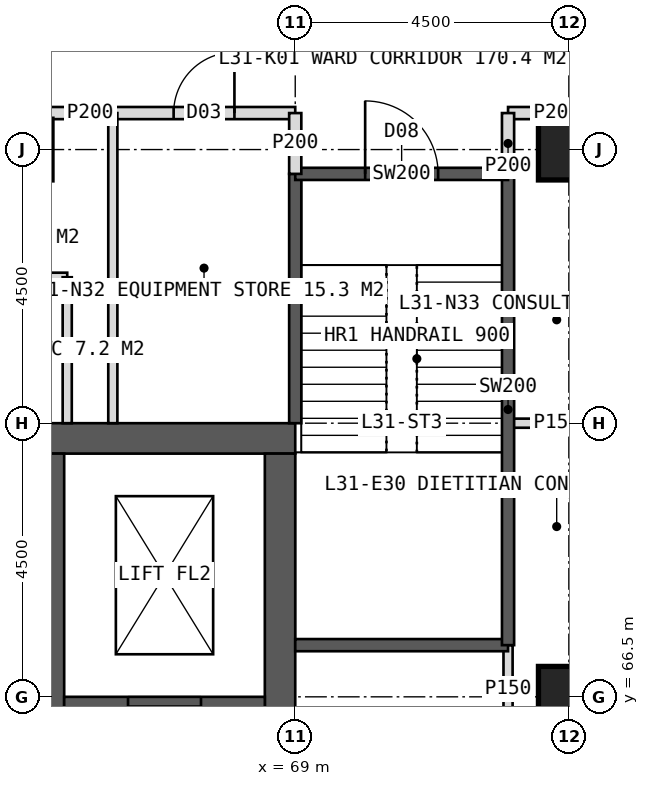
"""IFC4 building model, lengths in metres.
Left out: names, types, materials, properties, quantities, classifications, styles, units other than length and angle.
Written with IfcOpenShell. Run it as: python <this file> out.ifc"""

import sys

from ifc_helpers import new_model, si_unit, direction, frame, frame_2d, origin, origin_2d, place, context, subcontext, project, spatial, rectangle, hollow_rectangle, extrude, element, fill, save


model = new_model("IFC4")
c1 = context("Model", 3, precision=1e-05, world=origin(), true_north=direction((0.0, 1.0)))
c2 = subcontext(c1, "Body", "Model", "MODEL_VIEW")
j1 = project(units=[si_unit("LENGTHUNIT", "METRE"), si_unit("PLANEANGLEUNIT", "RADIAN")], contexts=[c1])
p1 = place(None, origin())
s1 = spatial("IfcSite", under=j1, at=p1, CompositionType="ELEMENT")
p2 = place(p1, origin())
s2 = spatial("IfcBuilding", under=s1, at=p2, CompositionType="ELEMENT")
p3 = place(p2, frame((0.0, 0.0, 132.0)))
s3 = spatial("IfcBuildingStorey", under=s2, at=p3, CompositionType="ELEMENT", Elevation=132.0)
p4 = place(p3, frame((51.0, 70.75, 0.0), z_axis=(0.0, 0.0, 1.0), x_axis=(1.0, 0.0, 0.0)))
e1 = element("IfcWall", 1, at=p4, inside=s3, PredefinedType="SHEAR", context=c2, shape_type="SweptSolid", body=[
    extrude(rectangle(XDim=18.0, YDim=0.5, at=frame_2d((9.0, 0.0))), origin(), (0.0, 0.0, 1.0), 4.0),
])
p5 = place(p4, frame((8.1, 0.0, 0.0)))
e2 = element("IfcOpeningElement", 2, at=p5, cuts=e1, PredefinedType="OPENING", context=c2, shape_type="SweptSolid", body=[
    extrude(rectangle(XDim=1.8, YDim=2.2, at=frame_2d((0.9, 1.1))), frame((0.0, 0.26, 0.0), z_axis=(0.0, -1.0, 0.0), x_axis=(1.0, 0.0, 0.0)), (0.0, 0.0, 1.0), 0.52),
])
p6 = place(p3, frame((68.75, 53.5, 0.0), z_axis=(0.0, 0.0, 1.0), x_axis=(0.0, 1.0, 0.0)))
e3 = element("IfcWall", 3, at=p6, inside=s3, PredefinedType="SHEAR", context=c2, shape_type="SweptSolid", body=[
    extrude(rectangle(XDim=17.0, YDim=0.5, at=frame_2d((8.5, 0.0))), origin(), (0.0, 0.0, 1.0), 4.0),
])
p7 = place(p6, frame((9.5, 0.0, 0.0)))
e4 = element("IfcOpeningElement", 4, at=p7, cuts=e3, PredefinedType="OPENING", context=c2, shape_type="SweptSolid", body=[
    extrude(rectangle(XDim=1.5, YDim=2.2, at=frame_2d((0.75, 1.1))), frame((0.0, 0.26, 0.0), z_axis=(0.0, -1.0, 0.0), x_axis=(1.0, 0.0, 0.0)), (0.0, 0.0, 1.0), 0.52),
])
p8 = place(p3, frame((65.05, 53.5, 0.0), z_axis=(0.0, 0.0, 1.0), x_axis=(0.0, 1.0, 0.0)))
e5 = element("IfcWall", 5, at=p8, inside=s3, PredefinedType="SHEAR", context=c2, shape_type="SweptSolid", body=[
    extrude(rectangle(XDim=17.0, YDim=0.3, at=frame_2d((8.5, 0.0))), origin(), (0.0, 0.0, 1.0), 4.0),
])
p9 = place(p3, frame((65.2, 66.35, 0.0), z_axis=(0.0, 0.0, 1.0), x_axis=(1.0, 0.0, 0.0)))
e6 = element("IfcWall", 6, at=p9, inside=s3, PredefinedType="SHEAR", context=c2, shape_type="SweptSolid", body=[
    extrude(rectangle(XDim=3.3, YDim=0.3, at=frame_2d((1.65, 0.0))), origin(), (0.0, 0.0, 1.0), 4.0),
])
p10 = place(p9, frame((1.05, 0.0, 0.0)))
e7 = element("IfcOpeningElement", 7, at=p10, cuts=e6, PredefinedType="OPENING", context=c2, shape_type="SweptSolid", body=[
    extrude(rectangle(XDim=1.2, YDim=2.2, at=frame_2d((0.6, 1.1))), frame((0.0, 0.16, 0.0), z_axis=(0.0, -1.0, 0.0), x_axis=(1.0, 0.0, 0.0)), (0.0, 0.0, 1.0), 0.32),
])
for number, where, z_axis, x_axis in (
    (8, (73.5, 75.5, 0.0), (0.0, 0.0, 1.0), (1.0, 0.0, 0.0)),
    (9, (73.5, 66.5, 0.0), (0.0, 0.0, 1.0), (1.0, 0.0, 0.0)),
):
    element("IfcColumn", number, at=place(p3, frame(where, z_axis=z_axis, x_axis=x_axis)), inside=s3, PredefinedType="COLUMN", context=c2, shape_type="SweptSolid", body=[
        extrude(hollow_rectangle(XDim=1.0, YDim=1.0, WallThickness=0.1, at=origin_2d()), origin(), (0.0, 0.0, 1.0), 4.0),
    ])
p11 = place(p3, frame((62.25, 76.1, 0.0), z_axis=(0.0, 0.0, 1.0), x_axis=(1.0, 0.0, 0.0)))
e10 = element("IfcWall", 10, at=p11, inside=s3, PredefinedType="PARTITIONING", context=c2, shape_type="SweptSolid", body=[
    extrude(rectangle(XDim=6.75, YDim=0.2, at=frame_2d((3.375, 0.0))), origin(), (0.0, 0.0, 1.0), 3.75),
])
p12 = place(p11, frame((0.325, 0.0, 0.0)))
e11 = element("IfcOpeningElement", 11, at=p12, cuts=e10, PredefinedType="OPENING", context=c2, shape_type="SweptSolid", body=[
    extrude(rectangle(XDim=1.0, YDim=2.1, at=frame_2d((0.5, 1.05))), frame((0.0, 0.11, 0.0), z_axis=(0.0, -1.0, 0.0), x_axis=(1.0, 0.0, 0.0)), (0.0, 0.0, 1.0), 0.22),
])
p13 = place(p11, frame((4.75, 0.0, 0.0)))
e12 = element("IfcOpeningElement", 12, at=p13, cuts=e10, PredefinedType="OPENING", context=c2, shape_type="SweptSolid", body=[
    extrude(rectangle(XDim=1.0, YDim=2.1, at=frame_2d((0.5, 1.05))), frame((0.0, 0.11, 0.0), z_axis=(0.0, -1.0, 0.0), x_axis=(1.0, 0.0, 0.0)), (0.0, 0.0, 1.0), 0.22),
])
p14 = place(p3, frame((72.5, 76.1, 0.0), z_axis=(0.0, 0.0, 1.0), x_axis=(1.0, 0.0, 0.0)))
e13 = element("IfcWall", 13, at=p14, inside=s3, PredefinedType="PARTITIONING", context=c2, shape_type="SweptSolid", body=[
    extrude(rectangle(XDim=1.6, YDim=0.2, at=frame_2d((0.8, 0.0))), origin(), (0.0, 0.0, 1.0), 3.75),
])
p15 = place(p3, frame((66.0, 71.0, 0.0), z_axis=(0.0, 0.0, 1.0), x_axis=(0.0, 1.0, 0.0)))
e14 = element("IfcWall", 14, at=p15, inside=s3, PredefinedType="PARTITIONING", context=c2, shape_type="SweptSolid", body=[
    extrude(rectangle(XDim=5.1, YDim=0.15, at=frame_2d((2.55, 0.0))), origin(), (0.0, 0.0, 1.0), 3.75),
])
p16 = place(p3, frame((62.25, 73.4, 0.0), z_axis=(0.0, 0.0, 1.0), x_axis=(1.0, 0.0, 0.0)))
e15 = element("IfcWall", 15, at=p16, inside=s3, PredefinedType="PARTITIONING", context=c2, shape_type="SweptSolid", body=[
    extrude(rectangle(XDim=3.0, YDim=0.15, at=frame_2d((1.5, 0.0))), origin(), (0.0, 0.0, 1.0), 3.75),
])
p17 = place(p3, frame((65.25, 71.0, 0.0), z_axis=(0.0, 0.0, 1.0), x_axis=(0.0, 1.0, 0.0)))
e16 = element("IfcWall", 16, at=p17, inside=s3, PredefinedType="PARTITIONING", context=c2, shape_type="SweptSolid", body=[
    extrude(rectangle(XDim=2.4, YDim=0.15, at=frame_2d((1.2, 0.0))), origin(), (0.0, 0.0, 1.0), 3.75),
])
p18 = place(p3, frame((72.5, 71.0, 0.0), z_axis=(0.0, 0.0, 1.0), x_axis=(1.0, 0.0, 0.0)))
e17 = element("IfcWall", 17, at=p18, inside=s3, PredefinedType="PARTITIONING", context=c2, shape_type="SweptSolid", body=[
    extrude(rectangle(XDim=1.6, YDim=0.15, at=frame_2d((0.8, 0.0))), origin(), (0.0, 0.0, 1.0), 3.75),
])
p19 = place(p3, frame((72.5, 65.9, 0.0), z_axis=(0.0, 0.0, 1.0), x_axis=(0.0, 1.0, 0.0)))
e18 = element("IfcWall", 18, at=p19, inside=s3, PredefinedType="PARTITIONING", context=c2, shape_type="SweptSolid", body=[
    extrude(rectangle(XDim=1.45, YDim=0.15, at=frame_2d((0.725, 0.0))), origin(), (0.0, 0.0, 1.0), 3.75),
])
p20 = place(p3, frame((69.0, 71.0, 0.0), z_axis=(0.0, 0.0, 1.0), x_axis=(0.0, 1.0, 0.0)))
e19 = element("IfcWall", 19, at=p20, inside=s3, PredefinedType="SOLIDWALL", context=c2, shape_type="SweptSolid", body=[
    extrude(rectangle(XDim=4.1, YDim=0.2, at=frame_2d((2.05, 0.0))), origin(), (0.0, 0.0, 1.0), 3.75),
])
p21 = place(p3, frame((69.0, 67.35, 0.0), z_axis=(0.0, 0.0, 1.0), x_axis=(1.0, 0.0, 0.0)))
e20 = element("IfcWall", 20, at=p21, inside=s3, PredefinedType="SOLIDWALL", context=c2, shape_type="SweptSolid", body=[
    extrude(rectangle(XDim=3.5, YDim=0.2, at=frame_2d((1.75, 0.0))), origin(), (0.0, 0.0, 1.0), 3.75),
])
p22 = place(p3, frame((72.5, 67.35, 0.0), z_axis=(0.0, 0.0, 1.0), x_axis=(0.0, 1.0, 0.0)))
e21 = element("IfcWall", 21, at=p22, inside=s3, PredefinedType="SOLIDWALL", context=c2, shape_type="SweptSolid", body=[
    extrude(rectangle(XDim=7.75, YDim=0.2, at=frame_2d((3.875, 0.0))), origin(), (0.0, 0.0, 1.0), 3.75),
])
p23 = place(p3, frame((69.0, 75.1, 0.0), z_axis=(0.0, 0.0, 1.0), x_axis=(1.0, 0.0, 0.0)))
e22 = element("IfcWall", 22, at=p23, inside=s3, PredefinedType="SOLIDWALL", context=c2, shape_type="SweptSolid", body=[
    extrude(rectangle(XDim=3.5, YDim=0.2, at=frame_2d((1.75, 0.0))), origin(), (0.0, 0.0, 1.0), 3.75),
])
p24 = place(p23, frame((1.15, 0.0, 0.0)))
e23 = element("IfcOpeningElement", 23, at=p24, cuts=e22, PredefinedType="OPENING", context=c2, shape_type="SweptSolid", body=[
    extrude(rectangle(XDim=1.2, YDim=2.1, at=frame_2d((0.6, 1.05))), frame((0.0, 0.11, 0.0), z_axis=(0.0, -1.0, 0.0), x_axis=(1.0, 0.0, 0.0)), (0.0, 0.0, 1.0), 0.22),
])
for number, where, z_axis, x_axis in (
    (24, (69.0, 75.1, 0.0), (0.0, 0.0, 1.0), (0.0, 1.0, 0.0)),
    (25, (72.5, 75.1, 0.0), (0.0, 0.0, 1.0), (0.0, 1.0, 0.0)),
):
    element("IfcWall", number, at=place(p3, frame(where, z_axis=z_axis, x_axis=x_axis)), inside=s3, PredefinedType="PARTITIONING", context=c2, shape_type="SweptSolid", body=[
        extrude(rectangle(XDim=1.0, YDim=0.2, at=frame_2d((0.5, 0.0))), origin(), (0.0, 0.0, 1.0), 3.75),
    ])
p25 = place(p13, origin())
e26 = element("IfcDoor", 26, at=p25, inside=s3, OperationType="SINGLE_SWING_RIGHT", PredefinedType="DOOR", context=c2, shape_type="SweptSolid", body=[
    extrude(rectangle(XDim=1.0, YDim=2.1, at=frame_2d((0.5, 1.05))), frame((0.0, 0.025, 0.0), z_axis=(0.0, -1.0, 0.0), x_axis=(1.0, 0.0, 0.0)), (0.0, 0.0, 1.0), 0.05),
])
fill(e12, e26)
p26 = place(p10, origin())
e27 = element("IfcDoor", 27, at=p26, inside=s3, OperationType="SLIDING_TO_LEFT", PredefinedType="DOOR", context=c2, shape_type="SweptSolid", body=[
    extrude(rectangle(XDim=1.2, YDim=2.2, at=frame_2d((0.6, 1.1))), frame((0.0, 0.025, 0.0), z_axis=(0.0, -1.0, 0.0), x_axis=(1.0, 0.0, 0.0)), (0.0, 0.0, 1.0), 0.05),
])
fill(e7, e27)
p27 = place(p24, origin())
e28 = element("IfcDoor", 28, at=p27, inside=s3, OperationType="SINGLE_SWING_LEFT", PredefinedType="DOOR", context=c2, shape_type="SweptSolid", body=[
    extrude(rectangle(XDim=1.2, YDim=2.1, at=frame_2d((0.6, 1.05))), frame((0.0, 0.025, 0.0), z_axis=(0.0, -1.0, 0.0), x_axis=(1.0, 0.0, 0.0)), (0.0, 0.0, 1.0), 0.05),
])
fill(e23, e28)
save(model, sys.argv[1])
